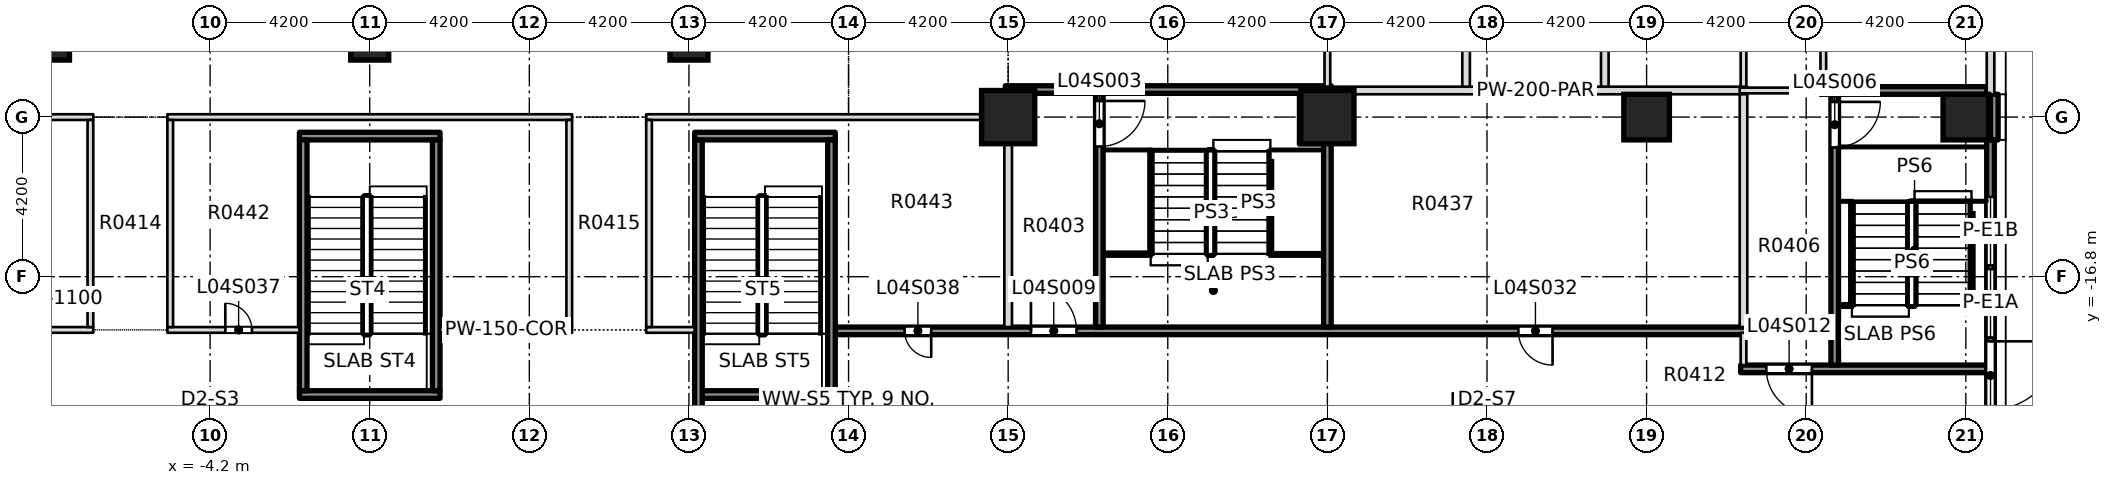
"""IFC4 building model, lengths in metres.
Left out: names, types, materials, properties, quantities, classifications, styles, units other than length and angle.
Written with IfcOpenShell. Run it as: python <this file> out.ifc"""

import sys

from ifc_helpers import new_model, si_unit, direction, frame, frame_2d, origin, origin_2d, place, context, subcontext, project, spatial, rectangle, extrude, element, fill, save


model = new_model("IFC4")
c1 = context("Model", 3, precision=1e-05, world=origin(), true_north=direction((0.0, 1.0)))
c2 = subcontext(c1, "Body", "Model", "MODEL_VIEW")
j1 = project(units=[si_unit("LENGTHUNIT", "METRE"), si_unit("PLANEANGLEUNIT", "RADIAN")], contexts=[c1])
p1 = place(None, origin())
s1 = spatial("IfcSite", under=j1, at=p1, CompositionType="ELEMENT")
p2 = place(p1, origin())
s2 = spatial("IfcBuilding", under=s1, at=p2, CompositionType="ELEMENT")
p3 = place(p2, frame((0.0, 0.0, 25.0)))
s3 = spatial("IfcBuildingStorey", under=s2, at=p3, CompositionType="ELEMENT", Elevation=25.0)
for number, where, z_axis, x_axis in (
    (1, (16.8, -12.6, -0.4), (0.0, 0.0, 1.0), (1.0, 0.0, 0.0)),
    (2, (25.2, -12.6, -0.4), (0.0, 0.0, 1.0), (1.0, 0.0, 0.0)),
):
    element("IfcColumn", number, at=place(p3, frame(where, z_axis=z_axis, x_axis=x_axis)), inside=s3, PredefinedType="COLUMN", context=c2, shape_type="SweptSolid", body=[
        extrude(rectangle(XDim=1.4, YDim=1.4, at=origin_2d()), origin(), (0.0, 0.0, 1.0), 5.0),
    ])
for number, where, z_axis, x_axis in (
    (3, (-8.4, -10.6, -0.4), (0.0, 0.0, 1.0), (1.0, 0.0, 0.0)),
    (4, (0.0, -10.6, -0.4), (0.0, 0.0, 1.0), (1.0, 0.0, 0.0)),
    (5, (8.4, -10.6, -0.4), (0.0, 0.0, 1.0), (1.0, 0.0, 0.0)),
):
    element("IfcColumn", number, at=place(p3, frame(where, z_axis=z_axis, x_axis=x_axis)), inside=s3, PredefinedType="COLUMN", context=c2, shape_type="SweptSolid", body=[
        extrude(rectangle(XDim=1.0, YDim=1.0, at=origin_2d()), origin(), (0.0, 0.0, 1.0), 5.0),
    ])
for number, where, z_axis, x_axis in (
    (6, (33.6, -12.6, 0.0), (0.0, 0.0, 1.0), (1.0, 0.0, 0.0)),
    (7, (42.0, -12.6, 0.0), (0.0, 0.0, 1.0), (1.0, 0.0, 0.0)),
):
    element("IfcColumn", number, at=place(p3, frame(where, z_axis=z_axis, x_axis=x_axis)), inside=s3, PredefinedType="COLUMN", context=c2, shape_type="SweptSolid", body=[
        extrude(rectangle(XDim=1.2, YDim=1.2, at=origin_2d()), origin(), (0.0, 0.0, 1.0), 5.0),
    ])
p4 = place(p3, frame((36.075, -19.225, 0.0), z_axis=(0.0, 0.0, 1.0), x_axis=(1.0, 0.0, 0.0)))
e8 = element("IfcWall", 8, at=p4, inside=s3, PredefinedType="SOLIDWALL", context=c2, shape_type="SweptSolid", body=[
    extrude(rectangle(XDim=6.475, YDim=0.2, at=frame_2d((3.238, 0.0))), origin(), (0.0, 0.0, 1.0), 4.6),
])
p5 = place(p4, frame((0.675, 0.0, 0.0)))
e9 = element("IfcOpeningElement", 9, at=p5, cuts=e8, PredefinedType="OPENING", context=c2, shape_type="SweptSolid", body=[
    extrude(rectangle(XDim=1.2, YDim=2.1, at=frame_2d((0.6, 1.05))), frame((0.0, 0.11, 0.0), z_axis=(0.0, -1.0, 0.0), x_axis=(1.0, 0.0, 0.0)), (0.0, 0.0, 1.0), 0.22),
])
p6 = place(p3, frame((-8.55, -18.2, 0.0), z_axis=(0.0, 0.0, 1.0), x_axis=(1.0, 0.0, 0.0)))
e10 = element("IfcWall", 10, at=p6, inside=s3, PredefinedType="PARTITIONING", context=c2, shape_type="SweptSolid", body=[
    extrude(rectangle(XDim=1.275, YDim=0.15, at=frame_2d((0.638, 0.0))), origin(), (0.0, 0.0, 1.0), 4.6),
])
p7 = place(p3, frame((-5.325, -18.2, 0.0), z_axis=(0.0, 0.0, 1.0), x_axis=(1.0, 0.0, 0.0)))
e11 = element("IfcWall", 11, at=p7, inside=s3, PredefinedType="PARTITIONING", context=c2, shape_type="SweptSolid", body=[
    extrude(rectangle(XDim=3.475, YDim=0.15, at=frame_2d((1.737, 0.0))), origin(), (0.0, 0.0, 1.0), 4.6),
])
p8 = place(p7, frame((1.525, 0.0, 0.0)))
e12 = element("IfcOpeningElement", 12, at=p8, cuts=e11, PredefinedType="OPENING", context=c2, shape_type="SweptSolid", body=[
    extrude(rectangle(XDim=0.7, YDim=2.1, at=frame_2d((0.35, 1.05))), frame((0.0, 0.085, 0.0), z_axis=(0.0, -1.0, 0.0), x_axis=(1.0, 0.0, 0.0)), (0.0, 0.0, 1.0), 0.17),
])
p9 = place(p3, frame((1.85, -18.2, 0.0), z_axis=(0.0, 0.0, 1.0), x_axis=(1.0, 0.0, 0.0)))
e13 = element("IfcWall", 13, at=p9, inside=s3, PredefinedType="PARTITIONING", context=c2, shape_type="SweptSolid", body=[
    extrude(rectangle(XDim=3.475, YDim=0.15, at=frame_2d((1.737, 0.0))), origin(), (0.0, 0.0, 1.0), 4.6),
])
p10 = place(p3, frame((7.275, -18.2, 0.0), z_axis=(0.0, 0.0, 1.0), x_axis=(1.0, 0.0, 0.0)))
e14 = element("IfcWall", 14, at=p10, inside=s3, PredefinedType="PARTITIONING", context=c2, shape_type="SweptSolid", body=[
    extrude(rectangle(XDim=1.275, YDim=0.15, at=frame_2d((0.638, 0.0))), origin(), (0.0, 0.0, 1.0), 4.6),
])
p11 = place(p3, frame((12.25, -18.225, 0.0), z_axis=(0.0, 0.0, 1.0), x_axis=(1.0, 0.0, 0.0)))
e15 = element("IfcWall", 15, at=p11, inside=s3, PredefinedType="SOLIDWALL", context=c2, shape_type="SweptSolid", body=[
    extrude(rectangle(XDim=24.0, YDim=0.2, at=frame_2d((12.0, 0.0))), origin(), (0.0, 0.0, 1.0), 4.6),
])
p12 = place(p11, frame((5.15, 0.0, 0.0)))
e16 = element("IfcOpeningElement", 16, at=p12, cuts=e15, PredefinedType="OPENING", context=c2, shape_type="SweptSolid", body=[
    extrude(rectangle(XDim=1.2, YDim=2.1, at=frame_2d((0.6, 1.05))), frame((0.0, 0.11, 0.0), z_axis=(0.0, -1.0, 0.0), x_axis=(1.0, 0.0, 0.0)), (0.0, 0.0, 1.0), 0.22),
])
p13 = place(p11, frame((17.975, 0.0, 0.0)))
e17 = element("IfcOpeningElement", 17, at=p13, cuts=e15, PredefinedType="OPENING", context=c2, shape_type="SweptSolid", body=[
    extrude(rectangle(XDim=0.9, YDim=2.1, at=frame_2d((0.45, 1.05))), frame((0.0, 0.11, 0.0), z_axis=(0.0, -1.0, 0.0), x_axis=(1.0, 0.0, 0.0)), (0.0, 0.0, 1.0), 0.22),
])
p14 = place(p11, frame((1.825, 0.0, 0.0)))
e18 = element("IfcOpeningElement", 18, at=p14, cuts=e15, PredefinedType="OPENING", context=c2, shape_type="SweptSolid", body=[
    extrude(rectangle(XDim=0.7, YDim=2.1, at=frame_2d((0.35, 1.05))), frame((0.0, 0.11, 0.0), z_axis=(0.0, -1.0, 0.0), x_axis=(1.0, 0.0, 0.0)), (0.0, 0.0, 1.0), 0.22),
])
p15 = place(p3, frame((-16.9, -12.6, 0.0), z_axis=(0.0, 0.0, 1.0), x_axis=(1.0, 0.0, 0.0)))
e19 = element("IfcWall", 19, at=p15, inside=s3, PredefinedType="PARTITIONING", context=c2, shape_type="SweptSolid", body=[
    extrude(rectangle(XDim=9.625, YDim=0.15, at=frame_2d((4.812, 0.0))), origin(), (0.0, 0.0, 1.0), 4.6),
])
p16 = place(p3, frame((-5.325, -12.6, 0.0), z_axis=(0.0, 0.0, 1.0), x_axis=(1.0, 0.0, 0.0)))
e20 = element("IfcWall", 20, at=p16, inside=s3, PredefinedType="PARTITIONING", context=c2, shape_type="SweptSolid", body=[
    extrude(rectangle(XDim=10.65, YDim=0.15, at=frame_2d((5.325, 0.0))), origin(), (0.0, 0.0, 1.0), 4.6),
])
p17 = place(p3, frame((7.275, -12.6, 0.0), z_axis=(0.0, 0.0, 1.0), x_axis=(1.0, 0.0, 0.0)))
e21 = element("IfcWall", 21, at=p17, inside=s3, PredefinedType="PARTITIONING", context=c2, shape_type="SweptSolid", body=[
    extrude(rectangle(XDim=9.625, YDim=0.15, at=frame_2d((4.812, 0.0))), origin(), (0.0, 0.0, 1.0), 4.6),
])
p18 = place(p3, frame((16.725, -11.875, 0.0), z_axis=(0.0, 0.0, 1.0), x_axis=(1.0, 0.0, 0.0)))
e22 = element("IfcWall", 22, at=p18, inside=s3, PredefinedType="SOLIDWALL", context=c2, shape_type="SweptSolid", body=[
    extrude(rectangle(XDim=8.575, YDim=0.2, at=frame_2d((4.288, 0.0))), origin(), (0.0, 0.0, 1.0), 4.6),
])
p19 = place(p3, frame((25.1, -11.9, 0.0), z_axis=(0.0, 0.0, 1.0), x_axis=(1.0, 0.0, 0.0)))
e23 = element("IfcWall", 23, at=p19, inside=s3, PredefinedType="PARTITIONING", context=c2, shape_type="SweptSolid", body=[
    extrude(rectangle(XDim=11.15, YDim=0.2, at=frame_2d((5.575, 0.0))), origin(), (0.0, 0.0, 1.0), 4.6),
])
p20 = place(p3, frame((36.05, -11.9, 0.0), z_axis=(0.0, 0.0, 1.0), x_axis=(1.0, 0.0, 0.0)))
e24 = element("IfcWall", 24, at=p20, inside=s3, PredefinedType="PARTITIONING", context=c2, shape_type="SweptSolid", body=[
    extrude(rectangle(XDim=2.275, YDim=0.15, at=frame_2d((1.137, 0.0))), origin(), (0.0, 0.0, 1.0), 4.6),
])
p21 = place(p3, frame((38.175, -11.9, 0.0), z_axis=(0.0, 0.0, 1.0), x_axis=(1.0, 0.0, 0.0)))
e25 = element("IfcWall", 25, at=p21, inside=s3, PredefinedType="SOLIDWALL", context=c2, shape_type="SweptSolid", body=[
    extrude(rectangle(XDim=4.375, YDim=0.2, at=frame_2d((2.188, 0.0))), origin(), (0.0, 0.0, 1.0), 4.6),
])
for number, where, z_axis, x_axis in (
    (26, (-7.35, -18.125, 0.0), (0.0, 0.0, 1.0), (0.0, 1.0, 0.0)),
    (27, (-5.25, -18.125, 0.0), (0.0, 0.0, 1.0), (0.0, 1.0, 0.0)),
    (28, (5.25, -18.125, 0.0), (0.0, 0.0, 1.0), (0.0, 1.0, 0.0)),
    (29, (7.35, -18.125, 0.0), (0.0, 0.0, 1.0), (0.0, 1.0, 0.0)),
):
    element("IfcWall", number, at=place(p3, frame(where, z_axis=z_axis, x_axis=x_axis)), inside=s3, PredefinedType="PARTITIONING", context=c2, shape_type="SweptSolid", body=[
        extrude(rectangle(XDim=5.45, YDim=0.15, at=frame_2d((2.725, 0.0))), origin(), (0.0, 0.0, 1.0), 4.6),
    ])
p22 = place(p3, frame((16.8, -18.125, 0.0), z_axis=(0.0, 0.0, 1.0), x_axis=(0.0, 1.0, 0.0)))
e30 = element("IfcWall", 30, at=p22, inside=s3, PredefinedType="PARTITIONING", context=c2, shape_type="SweptSolid", body=[
    extrude(rectangle(XDim=5.45, YDim=0.2, at=frame_2d((2.725, 0.0))), origin(), (0.0, 0.0, 1.0), 4.6),
])
p23 = place(p3, frame((16.8, -12.525, 0.0), z_axis=(0.0, 0.0, 1.0), x_axis=(0.0, 1.0, 0.0)))
e31 = element("IfcWall", 31, at=p23, inside=s3, PredefinedType="PARTITIONING", context=c2, shape_type="SweptSolid", body=[
    extrude(rectangle(XDim=0.55, YDim=0.15, at=frame_2d((0.275, 0.0))), origin(), (0.0, 0.0, 1.0), 4.6),
])
p24 = place(p3, frame((19.2, -18.125, 0.0), z_axis=(0.0, 0.0, 1.0), x_axis=(0.0, 1.0, 0.0)))
e32 = element("IfcWall", 32, at=p24, inside=s3, PredefinedType="SOLIDWALL", context=c2, shape_type="SweptSolid", body=[
    extrude(rectangle(XDim=6.15, YDim=0.2, at=frame_2d((3.075, 0.0))), origin(), (0.0, 0.0, 1.0), 4.6),
])
p25 = place(p24, frame((4.75, 0.0, 0.0)))
e33 = element("IfcOpeningElement", 33, at=p25, cuts=e32, PredefinedType="OPENING", context=c2, shape_type="SweptSolid", body=[
    extrude(rectangle(XDim=1.2, YDim=2.1, at=frame_2d((0.6, 1.05))), frame((0.0, 0.11, 0.0), z_axis=(0.0, -1.0, 0.0), x_axis=(1.0, 0.0, 0.0)), (0.0, 0.0, 1.0), 0.22),
])
p26 = place(p3, frame((25.2, -18.125, 0.0), z_axis=(0.0, 0.0, 1.0), x_axis=(0.0, 1.0, 0.0)))
e34 = element("IfcWall", 34, at=p26, inside=s3, PredefinedType="SOLIDWALL", context=c2, shape_type="SweptSolid", body=[
    extrude(rectangle(XDim=6.125, YDim=0.2, at=frame_2d((3.062, 0.0))), origin(), (0.0, 0.0, 1.0), 4.6),
])
p27 = place(p3, frame((25.2, -11.8, 0.0), z_axis=(0.0, 0.0, 1.0), x_axis=(0.0, 1.0, 0.0)))
e35 = element("IfcWall", 35, at=p27, inside=s3, PredefinedType="PARTITIONING", context=c2, shape_type="SweptSolid", body=[
    extrude(rectangle(XDim=11.725, YDim=0.15, at=frame_2d((5.863, 0.0))), origin(), (0.0, 0.0, 1.0), 4.6),
])
for number, where, z_axis, x_axis in (
    (36, (28.85, -11.8, 0.0), (0.0, 0.0, 1.0), (0.0, 1.0, 0.0)),
    (37, (32.5, -11.8, 0.0), (0.0, 0.0, 1.0), (0.0, 1.0, 0.0)),
):
    element("IfcWall", number, at=place(p3, frame(where, z_axis=z_axis, x_axis=x_axis)), inside=s3, PredefinedType="PARTITIONING", context=c2, shape_type="SweptSolid", body=[
        extrude(rectangle(XDim=11.725, YDim=0.2, at=frame_2d((5.863, 0.0))), origin(), (0.0, 0.0, 1.0), 4.6),
    ])
p28 = place(p3, frame((36.15, -19.125, 0.0), z_axis=(0.0, 0.0, 1.0), x_axis=(0.0, 1.0, 0.0)))
e38 = element("IfcWall", 38, at=p28, inside=s3, PredefinedType="PARTITIONING", context=c2, shape_type="SweptSolid", body=[
    extrude(rectangle(XDim=0.85, YDim=0.15, at=frame_2d((0.425, 0.0))), origin(), (0.0, 0.0, 1.0), 4.6),
])
p29 = place(p3, frame((36.15, -18.125, 0.0), z_axis=(0.0, 0.0, 1.0), x_axis=(0.0, 1.0, 0.0)))
e39 = element("IfcWall", 39, at=p29, inside=s3, PredefinedType="PARTITIONING", context=c2, shape_type="SweptSolid", body=[
    extrude(rectangle(XDim=6.125, YDim=0.2, at=frame_2d((3.062, 0.0))), origin(), (0.0, 0.0, 1.0), 4.6),
])
for number, where, z_axis, x_axis in (
    (40, (36.15, -11.8, 0.0), (0.0, 0.0, 1.0), (0.0, 1.0, 0.0)),
    (41, (38.25, -11.8, 0.0), (0.0, 0.0, 1.0), (0.0, 1.0, 0.0)),
):
    element("IfcWall", number, at=place(p3, frame(where, z_axis=z_axis, x_axis=x_axis)), inside=s3, PredefinedType="PARTITIONING", context=c2, shape_type="SweptSolid", body=[
        extrude(rectangle(XDim=11.725, YDim=0.15, at=frame_2d((5.863, 0.0))), origin(), (0.0, 0.0, 1.0), 4.6),
    ])
p30 = place(p3, frame((38.55, -19.125, 0.0), z_axis=(0.0, 0.0, 1.0), x_axis=(0.0, 1.0, 0.0)))
e42 = element("IfcWall", 42, at=p30, inside=s3, PredefinedType="SOLIDWALL", context=c2, shape_type="SweptSolid", body=[
    extrude(rectangle(XDim=7.125, YDim=0.2, at=frame_2d((3.562, 0.0))), origin(), (0.0, 0.0, 1.0), 4.6),
])
p31 = place(p30, frame((5.725, 0.0, 0.0)))
e43 = element("IfcOpeningElement", 43, at=p31, cuts=e42, PredefinedType="OPENING", context=c2, shape_type="SweptSolid", body=[
    extrude(rectangle(XDim=1.2, YDim=2.1, at=frame_2d((0.6, 1.05))), frame((0.0, 0.11, 0.0), z_axis=(0.0, -1.0, 0.0), x_axis=(1.0, 0.0, 0.0)), (0.0, 0.0, 1.0), 0.22),
])
p32 = place(p3, frame((42.65, -20.4, 0.0), z_axis=(0.0, 0.0, 1.0), x_axis=(0.0, 1.0, 0.0)))
e44 = element("IfcWall", 44, at=p32, inside=s3, PredefinedType="SOLIDWALL", context=c2, shape_type="SweptSolid", body=[
    extrude(rectangle(XDim=7.2, YDim=0.2, at=frame_2d((3.6, 0.0))), origin(), (0.0, 0.0, 1.0), 4.6),
])
p33 = place(p32, frame((2.0, 0.0, 0.9)))
e45 = element("IfcOpeningElement", 45, at=p33, cuts=e44, PredefinedType="OPENING", context=c2, shape_type="SweptSolid", body=[
    extrude(rectangle(XDim=1.8, YDim=2.8, at=frame_2d((0.9, 1.4))), frame((0.0, 0.11, 0.0), z_axis=(0.0, -1.0, 0.0), x_axis=(1.0, 0.0, 0.0)), (0.0, 0.0, 1.0), 0.22),
])
p34 = place(p32, frame((0.1, 0.0, 0.0)))
e46 = element("IfcOpeningElement", 46, at=p34, cuts=e44, PredefinedType="OPENING", context=c2, shape_type="SweptSolid", body=[
    extrude(rectangle(XDim=1.8, YDim=2.4, at=frame_2d((0.9, 1.2))), frame((0.0, 0.11, 0.0), z_axis=(0.0, -1.0, 0.0), x_axis=(1.0, 0.0, 0.0)), (0.0, 0.0, 1.0), 0.22),
])
p35 = place(p32, frame((3.9, 0.0, 0.9)))
e47 = element("IfcOpeningElement", 47, at=p35, cuts=e44, PredefinedType="OPENING", context=c2, shape_type="SweptSolid", body=[
    extrude(rectangle(XDim=1.8, YDim=2.8, at=frame_2d((0.9, 1.4))), frame((0.0, 0.11, 0.0), z_axis=(0.0, -1.0, 0.0), x_axis=(1.0, 0.0, 0.0)), (0.0, 0.0, 1.0), 0.22),
])
p36 = place(p3, frame((42.65, -12.0, 0.0), z_axis=(0.0, 0.0, 1.0), x_axis=(0.0, 1.0, 0.0)))
e48 = element("IfcWall", 48, at=p36, inside=s3, PredefinedType="STANDARD", context=c2, shape_type="SweptSolid", body=[
    extrude(rectangle(XDim=7.2, YDim=0.2, at=frame_2d((3.6, 0.0))), origin(), (0.0, 0.0, 1.0), 4.6),
])
p37 = place(p36, frame((1.8, 0.0, 0.9)))
e49 = element("IfcOpeningElement", 49, at=p37, cuts=e48, PredefinedType="OPENING", context=c2, shape_type="SweptSolid", body=[
    extrude(rectangle(XDim=3.6, YDim=2.8, at=frame_2d((1.8, 1.4))), frame((0.0, 0.11, 0.0), z_axis=(0.0, -1.0, 0.0), x_axis=(1.0, 0.0, 0.0)), (0.0, 0.0, 1.0), 0.22),
])
for number, where, z_axis, x_axis in (
    (50, (-1.85, -19.9, 0.0), (0.0, 0.0, 1.0), (1.0, 0.0, 0.0)),
    (51, (-1.85, -13.1, 0.0), (0.0, 0.0, 1.0), (1.0, 0.0, 0.0)),
):
    element("IfcWall", number, at=place(p3, frame(where, z_axis=z_axis, x_axis=x_axis)), inside=s3, PredefinedType="SOLIDWALL", context=c2, shape_type="SweptSolid", body=[
        extrude(rectangle(XDim=3.7, YDim=0.2, at=frame_2d((1.85, 0.0))), origin(), (0.0, 0.0, 1.0), 4.6),
    ])
for number, where, z_axis, x_axis in (
    (52, (-1.75, -19.8, 0.0), (0.0, 0.0, 1.0), (0.0, 1.0, 0.0)),
    (53, (1.75, -19.8, 0.0), (0.0, 0.0, 1.0), (0.0, 1.0, 0.0)),
):
    element("IfcWall", number, at=place(p3, frame(where, z_axis=z_axis, x_axis=x_axis)), inside=s3, PredefinedType="SOLIDWALL", context=c2, shape_type="SweptSolid", body=[
        extrude(rectangle(XDim=6.6, YDim=0.2, at=frame_2d((3.3, 0.0))), origin(), (0.0, 0.0, 1.0), 4.6),
    ])
for number, where, z_axis, x_axis in (
    (54, (8.55, -19.9, 0.0), (0.0, 0.0, 1.0), (1.0, 0.0, 0.0)),
    (55, (8.55, -13.1, 0.0), (0.0, 0.0, 1.0), (1.0, 0.0, 0.0)),
):
    element("IfcWall", number, at=place(p3, frame(where, z_axis=z_axis, x_axis=x_axis)), inside=s3, PredefinedType="SOLIDWALL", context=c2, shape_type="SweptSolid", body=[
        extrude(rectangle(XDim=3.7, YDim=0.2, at=frame_2d((1.85, 0.0))), origin(), (0.0, 0.0, 1.0), 4.6),
    ])
p38 = place(p3, frame((8.65, -20.3, 0.0), z_axis=(0.0, 0.0, 1.0), x_axis=(0.0, 1.0, 0.0)))
e56 = element("IfcWall", 56, at=p38, inside=s3, PredefinedType="SOLIDWALL", context=c2, shape_type="SweptSolid", body=[
    extrude(rectangle(XDim=7.1, YDim=0.2, at=frame_2d((3.55, 0.0))), origin(), (0.0, 0.0, 1.0), 4.6),
])
p39 = place(p3, frame((12.15, -19.8, 0.0), z_axis=(0.0, 0.0, 1.0), x_axis=(0.0, 1.0, 0.0)))
e57 = element("IfcWall", 57, at=p39, inside=s3, PredefinedType="SOLIDWALL", context=c2, shape_type="SweptSolid", body=[
    extrude(rectangle(XDim=6.6, YDim=0.2, at=frame_2d((3.3, 0.0))), origin(), (0.0, 0.0, 1.0), 4.6),
])
p40 = place(p3, frame((42.75, -13.2, 0.0), z_axis=(0.0, 0.0, 1.0), x_axis=(0.0, 1.0, 0.0)))
e58 = element("IfcWall", 58, at=p40, inside=s3, PredefinedType="SOLIDWALL", context=c2, shape_type="SweptSolid", body=[
    extrude(rectangle(XDim=1.2, YDim=0.2, at=frame_2d((0.6, 0.0))), origin(), (0.0, 0.0, 1.0), 4.6),
])
p41 = place(p25, origin())
e59 = element("IfcDoor", 59, at=p41, inside=s3, OperationType="DOUBLE_DOOR_SINGLE_SWING", PredefinedType="DOOR", context=c2, shape_type="SweptSolid", body=[
    extrude(rectangle(XDim=1.2, YDim=2.1, at=frame_2d((0.6, 1.05))), frame((0.0, 0.025, 0.0), z_axis=(0.0, -1.0, 0.0), x_axis=(1.0, 0.0, 0.0)), (0.0, 0.0, 1.0), 0.05),
])
fill(e33, e59)
p42 = place(p31, origin())
e60 = element("IfcDoor", 60, at=p42, inside=s3, OperationType="DOUBLE_DOOR_SINGLE_SWING", PredefinedType="DOOR", context=c2, shape_type="SweptSolid", body=[
    extrude(rectangle(XDim=1.2, YDim=2.1, at=frame_2d((0.6, 1.05))), frame((0.0, 0.025, 0.0), z_axis=(0.0, -1.0, 0.0), x_axis=(1.0, 0.0, 0.0)), (0.0, 0.0, 1.0), 0.05),
])
fill(e43, e60)
p43 = place(p12, origin())
e61 = element("IfcDoor", 61, at=p43, inside=s3, OperationType="SINGLE_SWING_LEFT", PredefinedType="DOOR", context=c2, shape_type="SweptSolid", body=[
    extrude(rectangle(XDim=1.2, YDim=2.1, at=frame_2d((0.6, 1.05))), frame((0.0, 0.025, 0.0), z_axis=(0.0, -1.0, 0.0), x_axis=(1.0, 0.0, 0.0)), (0.0, 0.0, 1.0), 0.05),
])
fill(e16, e61)
p44 = place(p5, origin())
e62 = element("IfcDoor", 62, at=p44, inside=s3, OperationType="SINGLE_SWING_LEFT", PredefinedType="DOOR", context=c2, shape_type="SweptSolid", body=[
    extrude(rectangle(XDim=1.2, YDim=2.1, at=frame_2d((0.6, 1.05))), frame((0.0, 0.025, 0.0), z_axis=(0.0, -1.0, 0.0), x_axis=(1.0, 0.0, 0.0)), (0.0, 0.0, 1.0), 0.05),
])
fill(e9, e62)
p45 = place(p13, origin())
e63 = element("IfcDoor", 63, at=p45, inside=s3, OperationType="SINGLE_SWING_LEFT", PredefinedType="DOOR", context=c2, shape_type="SweptSolid", body=[
    extrude(rectangle(XDim=0.9, YDim=2.1, at=frame_2d((0.45, 1.05))), frame((0.0, 0.025, 0.0), z_axis=(0.0, -1.0, 0.0), x_axis=(1.0, 0.0, 0.0)), (0.0, 0.0, 1.0), 0.05),
])
fill(e17, e63)
p46 = place(p8, origin())
e64 = element("IfcDoor", 64, at=p46, inside=s3, OperationType="SINGLE_SWING_LEFT", PredefinedType="DOOR", context=c2, shape_type="SweptSolid", body=[
    extrude(rectangle(XDim=0.7, YDim=2.1, at=frame_2d((0.35, 1.05))), frame((0.0, 0.025, 0.0), z_axis=(0.0, -1.0, 0.0), x_axis=(1.0, 0.0, 0.0)), (0.0, 0.0, 1.0), 0.05),
])
fill(e12, e64)
p47 = place(p14, origin())
e65 = element("IfcDoor", 65, at=p47, inside=s3, OperationType="SINGLE_SWING_LEFT", PredefinedType="DOOR", context=c2, shape_type="SweptSolid", body=[
    extrude(rectangle(XDim=0.7, YDim=2.1, at=frame_2d((0.35, 1.05))), frame((0.0, 0.025, 0.0), z_axis=(0.0, -1.0, 0.0), x_axis=(1.0, 0.0, 0.0)), (0.0, 0.0, 1.0), 0.05),
])
fill(e18, e65)
p48 = place(p33, origin())
e66 = element("IfcWindow", 66, at=p48, inside=s3, PartitioningType="SINGLE_PANEL", PredefinedType="WINDOW", context=c2, shape_type="SweptSolid", body=[
    extrude(rectangle(XDim=1.8, YDim=2.8, at=frame_2d((0.9, 1.4))), frame((0.0, 0.03, 0.0), z_axis=(0.0, -1.0, 0.0), x_axis=(1.0, 0.0, 0.0)), (0.0, 0.0, 1.0), 0.06),
])
fill(e45, e66)
p49 = place(p34, origin())
e67 = element("IfcDoor", 67, at=p49, inside=s3, OperationType="SINGLE_SWING_LEFT", PredefinedType="DOOR", context=c2, shape_type="SweptSolid", body=[
    extrude(rectangle(XDim=1.8, YDim=2.4, at=frame_2d((0.9, 1.2))), frame((0.0, 0.025, 0.0), z_axis=(0.0, -1.0, 0.0), x_axis=(1.0, 0.0, 0.0)), (0.0, 0.0, 1.0), 0.05),
])
fill(e46, e67)
p50 = place(p35, origin())
e68 = element("IfcWindow", 68, at=p50, inside=s3, PartitioningType="SINGLE_PANEL", PredefinedType="WINDOW", context=c2, shape_type="SweptSolid", body=[
    extrude(rectangle(XDim=1.8, YDim=2.8, at=frame_2d((0.9, 1.4))), frame((0.0, 0.03, 0.0), z_axis=(0.0, -1.0, 0.0), x_axis=(1.0, 0.0, 0.0)), (0.0, 0.0, 1.0), 0.06),
])
fill(e47, e68)
save(model, sys.argv[1])
